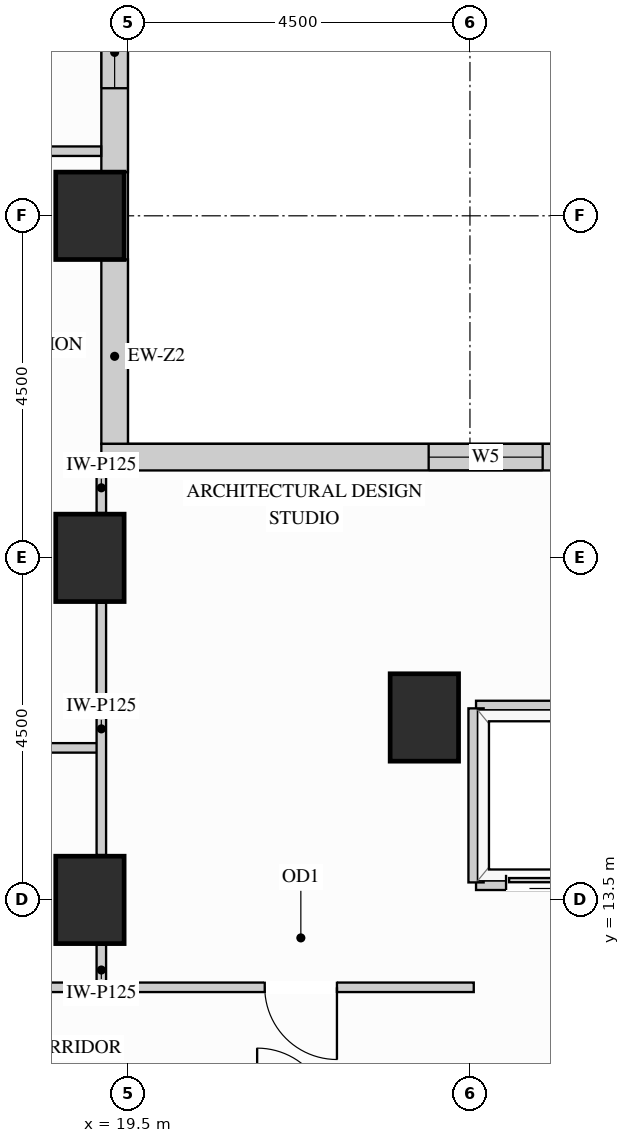
"""IFC4 building model, lengths in metres.
Left out: names, types, materials, properties, quantities, classifications, styles, units other than length and angle.
Written with IfcOpenShell. Run it as: python <this file> out.ifc"""

import sys

from ifc_helpers import new_model, si_unit, direction, frame, frame_2d, origin, origin_2d, place, context, subcontext, project, spatial, rectangle, extrude, source, transform, mapped, element, fill, save


model = new_model("IFC4")
c1 = context("Model", 3, precision=1e-05, world=origin(), true_north=direction((0.0, 1.0)))
c2 = subcontext(c1, "Body", "Model", "MODEL_VIEW")
j1 = project(units=[si_unit("LENGTHUNIT", "METRE"), si_unit("PLANEANGLEUNIT", "RADIAN")], contexts=[c1])
p1 = place(None, origin())
s1 = spatial("IfcSite", under=j1, at=p1, CompositionType="ELEMENT")
p2 = place(p1, origin())
s2 = spatial("IfcBuilding", under=s1, at=p2, CompositionType="ELEMENT")
p3 = place(p2, frame((0.0, 0.0, 135.0)))
s3 = spatial("IfcBuildingStorey", under=s2, at=p3, CompositionType="ELEMENT", Elevation=135.0)
m1 = source(origin(), c2, "Body", "SweptSolid", [
    extrude(rectangle(XDim=0.9, YDim=1.15, at=origin_2d()), origin(), (0.0, 0.0, 1.0), 3.32),
])
for number, where, z_axis, x_axis in (
    (1, (19.0, 13.5, 0.0), (0.0, 0.0, 1.0), (1.0, 0.0, 0.0)),
    (2, (19.0, 18.0, 0.0), (0.0, 0.0, 1.0), (1.0, 0.0, 0.0)),
    (3, (19.0, 22.5, 0.0), (0.0, 0.0, 1.0), (1.0, 0.0, 0.0)),
    (4, (23.4, 15.9, 0.0), (0.0, 0.0, 1.0), (1.0, 0.0, 0.0)),
):
    element("IfcColumn", number, at=place(p3, frame(where, z_axis=z_axis, x_axis=x_axis)), inside=s3, PredefinedType="COLUMN", context=c2, shape_type="MappedRepresentation", body=[
        mapped(m1, transform((0.0, 0.0, 0.0), x_axis=(1.0, 0.0, 0.0), y_axis=(0.0, 1.0, 0.0), z_axis=(0.0, 0.0, 1.0))),
    ])
m2 = source(origin(), c2, "Body", "SweptSolid", [
    extrude(rectangle(XDim=2.429, YDim=0.35, at=frame_2d((1.214, 0.0))), origin(), (0.0, 0.0, 1.0), 2.459),
])
p4 = place(p3, frame((19.325, 19.498, 0.0), z_axis=(0.0, 0.0, 1.0), x_axis=(0.0, 1.0, 0.0)))
e5 = element("IfcWall", 5, at=p4, inside=s3, PredefinedType="SOLIDWALL", context=c2, shape_type="MappedRepresentation", body=[
    mapped(m2, transform((0.0, 0.0, 0.0), x_axis=(1.0, 0.0, 0.0), y_axis=(0.0, 1.0, 0.0), z_axis=(0.0, 0.0, 1.0))),
])
p5 = place(p3, frame((19.325, 23.073, 0.0), z_axis=(0.0, 0.0, 1.0), x_axis=(0.0, 1.0, 0.0)))
e6 = element("IfcWall", 6, at=p5, inside=s3, PredefinedType="SOLIDWALL", context=c2, shape_type="SweptSolid", body=[
    extrude(rectangle(XDim=3.154, YDim=0.35, at=frame_2d((1.577, 0.0))), origin(), (0.0, 0.0, 1.0), 2.459),
])
p6 = place(p5, frame((1.105, 0.0, 0.78)))
e7 = element("IfcOpeningElement", 7, at=p6, cuts=e6, PredefinedType="OPENING", context=c2, shape_type="SweptSolid", body=[
    extrude(rectangle(XDim=1.5, YDim=1.499, at=frame_2d((0.75, 0.75))), frame((0.0, 0.185, 0.0), z_axis=(0.0, -1.0, 0.0), x_axis=(1.0, 0.0, 0.0)), (0.0, 0.0, 1.0), 0.37),
])
p7 = place(p3, frame((34.75, 19.325, 0.0), z_axis=(0.0, 0.0, 1.0), x_axis=(-1.0, 0.0, 0.0)))
e8 = element("IfcWall", 8, at=p7, inside=s3, PredefinedType="SOLIDWALL", context=c2, shape_type="SweptSolid", body=[
    extrude(rectangle(XDim=15.6, YDim=0.35, at=frame_2d((7.8, 0.0))), origin(), (0.0, 0.0, 1.0), 3.305),
])
p8 = place(p7, frame((4.307, 0.0, 0.78)))
e9 = element("IfcOpeningElement", 9, at=p8, cuts=e8, PredefinedType="OPENING", context=c2, shape_type="SweptSolid", body=[
    extrude(rectangle(XDim=1.5, YDim=2.0, at=frame_2d((0.75, 1.0))), frame((0.0, 0.185, 0.0), z_axis=(0.0, -1.0, 0.0), x_axis=(1.0, 0.0, 0.0)), (0.0, 0.0, 1.0), 0.37),
])
p9 = place(p7, frame((9.793, 0.0, 0.78)))
e10 = element("IfcOpeningElement", 10, at=p9, cuts=e8, PredefinedType="OPENING", context=c2, shape_type="SweptSolid", body=[
    extrude(rectangle(XDim=1.5, YDim=2.0, at=frame_2d((0.75, 1.0))), frame((0.0, 0.185, 0.0), z_axis=(0.0, -1.0, 0.0), x_axis=(1.0, 0.0, 0.0)), (0.0, 0.0, 1.0), 0.37),
])
m3 = source(origin(), c2, "Body", "SweptSolid", [
    extrude(rectangle(XDim=2.6, YDim=0.125, at=frame_2d((1.3, 0.0))), origin(), (0.0, 0.0, 1.0), 3.305),
])
p10 = place(p3, frame((16.55, 15.5, 0.0), z_axis=(0.0, 0.0, 1.0), x_axis=(1.0, 0.0, 0.0)))
e11 = element("IfcWall", 11, at=p10, inside=s3, PredefinedType="PARTITIONING", context=c2, shape_type="MappedRepresentation", body=[
    mapped(m3, transform((0.0, 0.0, 0.0), x_axis=(1.0, 0.0, 0.0), y_axis=(0.0, 1.0, 0.0), z_axis=(0.0, 0.0, 1.0))),
])
m4 = source(origin(), c2, "Body", "SweptSolid", [
    extrude(rectangle(XDim=2.598, YDim=0.125, at=frame_2d((1.299, 0.0))), origin(), (0.0, 0.0, 1.0), 3.305),
])
p11 = place(p3, frame((16.55, 23.35, 0.0), z_axis=(0.0, 0.0, 1.0), x_axis=(1.0, 0.0, 0.0)))
e12 = element("IfcWall", 12, at=p11, inside=s3, PredefinedType="PARTITIONING", context=c2, shape_type="MappedRepresentation", body=[
    mapped(m4, transform((0.0, 0.0, 0.0), x_axis=(1.0, 0.0, 0.0), y_axis=(0.0, 1.0, 0.0), z_axis=(0.0, 0.0, 1.0))),
])
m5 = source(origin(), c2, "Body", "SweptSolid", [
    extrude(rectangle(XDim=0.56, YDim=0.125, at=frame_2d((0.28, 0.0))), origin(), (0.0, 0.0, 1.0), 2.617),
])
p12 = place(p3, frame((19.15, 12.35, 0.0), z_axis=(0.0, 0.0, 1.0), x_axis=(0.0, 1.0, 0.0)))
e13 = element("IfcWall", 13, at=p12, inside=s3, PredefinedType="PARTITIONING", context=c2, shape_type="MappedRepresentation", body=[
    mapped(m5, transform((0.0, 0.0, 0.0), x_axis=(1.0, 0.0, 0.0), y_axis=(0.0, 1.0, 0.0), z_axis=(0.0, 0.0, 1.0))),
])
m6 = source(origin(), c2, "Body", "SweptSolid", [
    extrude(rectangle(XDim=3.32, YDim=0.125, at=frame_2d((1.66, 0.0))), origin(), (0.0, 0.0, 1.0), 2.617),
])
p13 = place(p3, frame((19.15, 14.09, 0.0), z_axis=(0.0, 0.0, 1.0), x_axis=(0.0, 1.0, 0.0)))
e14 = element("IfcWall", 14, at=p13, inside=s3, PredefinedType="PARTITIONING", context=c2, shape_type="MappedRepresentation", body=[
    mapped(m6, transform((0.0, 0.0, 0.0), x_axis=(1.0, 0.0, 0.0), y_axis=(0.0, 1.0, 0.0), z_axis=(0.0, 0.0, 1.0))),
])
m7 = source(origin(), c2, "Body", "SweptSolid", [
    extrude(rectangle(XDim=0.558, YDim=0.125, at=frame_2d((0.279, 0.0))), origin(), (0.0, 0.0, 1.0), 2.459),
])
p14 = place(p3, frame((19.15, 18.59, 0.0), z_axis=(0.0, 0.0, 1.0), x_axis=(0.0, 1.0, 0.0)))
e15 = element("IfcWall", 15, at=p14, inside=s3, PredefinedType="PARTITIONING", context=c2, shape_type="MappedRepresentation", body=[
    mapped(m7, transform((0.0, 0.0, 0.0), x_axis=(1.0, 0.0, 0.0), y_axis=(0.0, 1.0, 0.0), z_axis=(0.0, 0.0, 1.0))),
])
m8 = source(origin(), c2, "Body", "SweptSolid", [
    extrude(rectangle(XDim=2.95, YDim=0.125, at=frame_2d((1.475, 0.0))), origin(), (0.0, 0.0, 1.0), 3.305),
])
p15 = place(p3, frame((16.55, 12.35, 0.0), z_axis=(0.0, 0.0, 1.0), x_axis=(1.0, 0.0, 0.0)))
e16 = element("IfcWall", 16, at=p15, inside=s3, PredefinedType="PARTITIONING", context=c2, shape_type="MappedRepresentation", body=[
    mapped(m8, transform((0.0, 0.0, 0.0), x_axis=(1.0, 0.0, 0.0), y_axis=(0.0, 1.0, 0.0), z_axis=(0.0, 0.0, 1.0))),
])
p16 = place(p3, frame((19.5, 12.35, 0.0), z_axis=(0.0, 0.0, 1.0), x_axis=(1.0, 0.0, 0.0)))
e17 = element("IfcWall", 17, at=p16, inside=s3, PredefinedType="PARTITIONING", context=c2, shape_type="SweptSolid", body=[
    extrude(rectangle(XDim=4.55, YDim=0.125, at=frame_2d((2.275, 0.0))), origin(), (0.0, 0.0, 1.0), 3.305),
])
p17 = place(p16, frame((1.8, 0.0, 0.0)))
e18 = element("IfcOpeningElement", 18, at=p17, cuts=e17, PredefinedType="OPENING", context=c2, shape_type="SweptSolid", body=[
    extrude(rectangle(XDim=0.95, YDim=2.15, at=frame_2d((0.475, 1.075))), frame((0.0, 0.073, 0.0), z_axis=(0.0, -1.0, 0.0), x_axis=(1.0, 0.0, 0.0)), (0.0, 0.0, 1.0), 0.145),
])
m9 = source(origin(), c2, "Body", "SweptSolid", [
    extrude(rectangle(XDim=1.89, YDim=0.2, at=frame_2d((0.945, 0.0))), origin(), (0.0, 0.0, 1.0), 2.617),
])
p18 = place(p3, frame((24.08, 16.02, 0.0), z_axis=(0.0, 0.0, 1.0), x_axis=(1.0, 0.0, 0.0)))
e19 = element("IfcWall", 19, at=p18, inside=s3, PredefinedType="PARTITIONING", context=c2, shape_type="MappedRepresentation", body=[
    mapped(m9, transform((0.0, 0.0, 0.0), x_axis=(1.0, 0.0, 0.0), y_axis=(0.0, 1.0, 0.0), z_axis=(0.0, 0.0, 1.0))),
])
p19 = place(p3, frame((24.08, 13.73, 0.0), z_axis=(0.0, 0.0, 1.0), x_axis=(1.0, 0.0, 0.0)))
e20 = element("IfcWall", 20, at=p19, inside=s3, PredefinedType="PARTITIONING", context=c2, shape_type="SweptSolid", body=[
    extrude(rectangle(XDim=1.89, YDim=0.2, at=frame_2d((0.945, 0.0))), origin(), (0.0, 0.0, 1.0), 2.386),
])
p20 = place(p19, frame((0.395, 0.0, 0.0)))
e21 = element("IfcOpeningElement", 21, at=p20, cuts=e20, PredefinedType="OPENING", context=c2, shape_type="SweptSolid", body=[
    extrude(rectangle(XDim=1.1, YDim=2.2, at=frame_2d((0.55, 1.1))), frame((0.0, 0.11, 0.0), z_axis=(0.0, -1.0, 0.0), x_axis=(1.0, 0.0, 0.0)), (0.0, 0.0, 1.0), 0.22),
])
m10 = source(origin(), c2, "Body", "SweptSolid", [
    extrude(rectangle(XDim=2.29, YDim=0.2, at=frame_2d((1.145, 0.0))), origin(), (0.0, 0.0, 1.0), 3.305),
])
p21 = place(p3, frame((24.08, 13.73, 0.0), z_axis=(0.0, 0.0, 1.0), x_axis=(0.0, 1.0, 0.0)))
e22 = element("IfcWall", 22, at=p21, inside=s3, PredefinedType="PARTITIONING", context=c2, shape_type="MappedRepresentation", body=[
    mapped(m10, transform((0.0, 0.0, 0.0), x_axis=(1.0, 0.0, 0.0), y_axis=(0.0, 1.0, 0.0), z_axis=(0.0, 0.0, 1.0))),
])
m11 = source(origin(), c2, "Body", "SweptSolid", [
    extrude(rectangle(XDim=1.1, YDim=2.2, at=frame_2d((0.55, 1.1))), frame((0.0, 0.025, 0.0), z_axis=(0.0, -1.0, 0.0), x_axis=(1.0, 0.0, 0.0)), (0.0, 0.0, 1.0), 0.05),
])
p22 = place(p20, origin())
e23 = element("IfcDoor", 23, at=p22, inside=s3, OperationType="SLIDING_TO_LEFT", PredefinedType="DOOR", context=c2, shape_type="MappedRepresentation", body=[
    mapped(m11, transform((0.0, 0.0, 0.0), x_axis=(1.0, 0.0, 0.0), y_axis=(0.0, 1.0, 0.0), z_axis=(0.0, 0.0, 1.0))),
])
fill(e21, e23)
m12 = source(origin(), c2, "Body", "SweptSolid", [
    extrude(rectangle(XDim=0.95, YDim=2.15, at=frame_2d((0.475, 1.075))), frame((0.0, 0.025, 0.0), z_axis=(0.0, -1.0, 0.0), x_axis=(1.0, 0.0, 0.0)), (0.0, 0.0, 1.0), 0.05),
])
p23 = place(p17, origin())
e24 = element("IfcDoor", 24, at=p23, inside=s3, OperationType="SINGLE_SWING_RIGHT", PredefinedType="DOOR", context=c2, shape_type="MappedRepresentation", body=[
    mapped(m12, transform((0.0, 0.0, 0.0), x_axis=(1.0, 0.0, 0.0), y_axis=(0.0, 1.0, 0.0), z_axis=(0.0, 0.0, 1.0))),
])
fill(e18, e24)
m13 = source(origin(), c2, "Body", "SweptSolid", [
    extrude(rectangle(XDim=1.5, YDim=1.499, at=frame_2d((0.75, 0.75))), frame((0.0, 0.03, 0.0), z_axis=(0.0, -1.0, 0.0), x_axis=(1.0, 0.0, 0.0)), (0.0, 0.0, 1.0), 0.06),
])
p24 = place(p6, origin())
e25 = element("IfcWindow", 25, at=p24, inside=s3, PartitioningType="SINGLE_PANEL", PredefinedType="WINDOW", context=c2, shape_type="MappedRepresentation", body=[
    mapped(m13, transform((0.0, 0.0, 0.0), x_axis=(1.0, 0.0, 0.0), y_axis=(0.0, 1.0, 0.0), z_axis=(0.0, 0.0, 1.0))),
])
fill(e7, e25)
m14 = source(origin(), c2, "Body", "SweptSolid", [
    extrude(rectangle(XDim=1.5, YDim=2.0, at=frame_2d((0.75, 1.0))), frame((0.0, 0.03, 0.0), z_axis=(0.0, -1.0, 0.0), x_axis=(1.0, 0.0, 0.0)), (0.0, 0.0, 1.0), 0.06),
])
p25 = place(p9, origin())
e26 = element("IfcWindow", 26, at=p25, inside=s3, PartitioningType="SINGLE_PANEL", PredefinedType="WINDOW", context=c2, shape_type="MappedRepresentation", body=[
    mapped(m14, transform((0.0, 0.0, 0.0), x_axis=(1.0, 0.0, 0.0), y_axis=(0.0, 1.0, 0.0), z_axis=(0.0, 0.0, 1.0))),
])
fill(e10, e26)
save(model, sys.argv[1])
